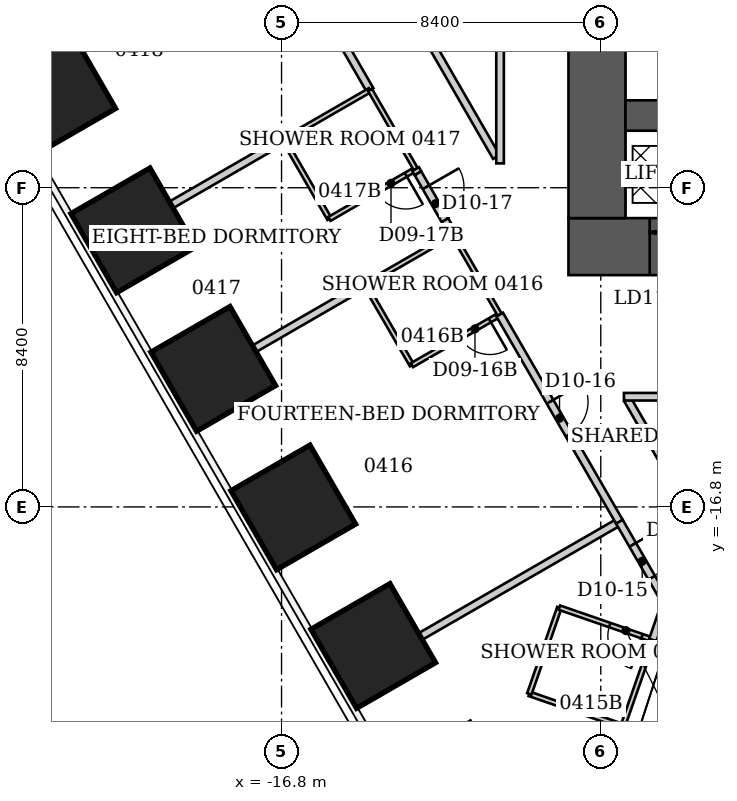
"""IFC4 building model, lengths in metres.
Left out: names, types, materials, properties, quantities, classifications, styles, units other than length and angle.
Written with IfcOpenShell. Run it as: python <this file> out.ifc"""

import sys

from ifc_helpers import new_model, si_unit, direction, frame, frame_2d, origin, origin_2d, place, context, subcontext, project, spatial, rectangle, extrude, element, fill, save


model = new_model("IFC4")
c1 = context("Model", 3, precision=1e-05, world=origin(), true_north=direction((0.0, 1.0)))
c2 = subcontext(c1, "Body", "Model", "MODEL_VIEW")
j1 = project(units=[si_unit("LENGTHUNIT", "METRE"), si_unit("PLANEANGLEUNIT", "RADIAN")], contexts=[c1])
p1 = place(None, origin())
s1 = spatial("IfcSite", under=j1, at=p1, CompositionType="ELEMENT")
p2 = place(p1, origin())
s2 = spatial("IfcBuilding", under=s1, at=p2, CompositionType="ELEMENT")
p3 = place(p2, frame((0.0, 0.0, 23.0)))
s3 = spatial("IfcBuildingStorey", under=s2, at=p3, CompositionType="ELEMENT", Elevation=23.0)
for number, where, z_axis, x_axis in (
    (1, (-14.387, -20.459, 0.0), (0.0, 0.0, 1.0), (-0.866, -0.5, 0.0)),
    (2, (-16.491, -16.813, 0.0), (0.0, 0.0, 1.0), (-0.866, -0.5, 0.0)),
    (3, (-18.596, -13.167, 0.0), (0.0, 0.0, 1.0), (-0.866, -0.5, 0.0)),
    (4, (-20.701, -9.521, 0.0), (0.0, 0.0, 1.0), (-0.866, -0.5, 0.0)),
    (5, (-22.806, -5.875, 0.0), (0.0, 0.0, 1.0), (-0.866, -0.5, 0.0)),
):
    element("IfcColumn", number, at=place(p3, frame(where, z_axis=z_axis, x_axis=x_axis)), inside=s3, PredefinedType="COLUMN", context=c2, shape_type="SweptSolid", body=[
        extrude(rectangle(XDim=2.4, YDim=2.4, at=origin_2d()), origin(), (0.0, 0.0, 1.0), 3.8),
    ])
p4 = place(p3, frame((-9.25, -9.95, 0.0), z_axis=(0.0, 0.0, 1.0), x_axis=(1.0, 0.0, 0.0)))
e6 = element("IfcWall", 6, at=p4, inside=s3, PredefinedType="SHEAR", context=c2, shape_type="SweptSolid", body=[
    extrude(rectangle(XDim=18.5, YDim=1.5, at=frame_2d((9.25, 0.0))), origin(), (0.0, 0.0, 1.0), 3.8),
])
p5 = place(p4, frame((2.137, 0.0, 0.0)))
e7 = element("IfcOpeningElement", 7, at=p5, cuts=e6, PredefinedType="OPENING", context=c2, shape_type="SweptSolid", body=[
    extrude(rectangle(XDim=1.1, YDim=2.1, at=frame_2d((0.55, 1.05))), frame((0.0, 0.75, 0.0), z_axis=(0.0, -1.0, 0.0), x_axis=(1.0, 0.0, 0.0)), (0.0, 0.0, 1.0), 1.5),
])
p6 = place(p4, frame((4.762, 0.0, 0.0)))
e8 = element("IfcOpeningElement", 8, at=p6, cuts=e6, PredefinedType="OPENING", context=c2, shape_type="SweptSolid", body=[
    extrude(rectangle(XDim=1.1, YDim=2.1, at=frame_2d((0.55, 1.05))), frame((0.0, 0.75, 0.0), z_axis=(0.0, -1.0, 0.0), x_axis=(1.0, 0.0, 0.0)), (0.0, 0.0, 1.0), 1.5),
])
p7 = place(p4, frame((7.387, 0.0, 0.0)))
e9 = element("IfcOpeningElement", 9, at=p7, cuts=e6, PredefinedType="OPENING", context=c2, shape_type="SweptSolid", body=[
    extrude(rectangle(XDim=1.1, YDim=2.1, at=frame_2d((0.55, 1.05))), frame((0.0, 0.75, 0.0), z_axis=(0.0, -1.0, 0.0), x_axis=(1.0, 0.0, 0.0)), (0.0, 0.0, 1.0), 1.5),
])
p8 = place(p3, frame((-8.5, -9.2, 0.0), z_axis=(0.0, 0.0, 1.0), x_axis=(0.0, 1.0, 0.0)))
e10 = element("IfcWall", 10, at=p8, inside=s3, PredefinedType="SHEAR", context=c2, shape_type="SweptSolid", body=[
    extrude(rectangle(XDim=15.3, YDim=1.5, at=frame_2d((7.65, 0.0))), origin(), (0.0, 0.0, 1.0), 3.8),
])
p9 = place(p8, frame((10.7, 0.0, 0.0)))
e11 = element("IfcOpeningElement", 11, at=p9, cuts=e10, PredefinedType="OPENING", context=c2, shape_type="SweptSolid", body=[
    extrude(rectangle(XDim=1.2, YDim=2.2, at=frame_2d((0.6, 1.1))), frame((0.0, 0.75, 0.0), z_axis=(0.0, -1.0, 0.0), x_axis=(1.0, 0.0, 0.0)), (0.0, 0.0, 1.0), 1.5),
])
p10 = place(p3, frame((-7.75, -6.5, 0.0), z_axis=(0.0, 0.0, 1.0), x_axis=(1.0, 0.0, 0.0)))
e12 = element("IfcWall", 12, at=p10, inside=s3, PredefinedType="SHEAR", context=c2, shape_type="SweptSolid", body=[
    extrude(rectangle(XDim=15.5, YDim=0.8, at=frame_2d((7.75, 0.0))), origin(), (0.0, 0.0, 1.0), 3.8),
])
p11 = place(p3, frame((-21.726, -10.02, 0.0), z_axis=(0.0, 0.0, 1.0), x_axis=(0.865919350456, 0.50018364478, 0.0)))
e13 = element("IfcWall", 13, at=p11, inside=s3, PredefinedType="PARTITIONING", context=c2, shape_type="SweptSolid", body=[
    extrude(rectangle(XDim=5.758, YDim=0.2, at=frame_2d((2.879, 0.0))), origin(), (0.0, 0.0, 1.0), 3.023),
])
p12 = place(p3, frame((-19.546, -13.81, 0.0), z_axis=(0.0, 0.0, 1.0), x_axis=(0.865702137343, 0.500559496364, 0.0)))
e14 = element("IfcWall", 14, at=p12, inside=s3, PredefinedType="PARTITIONING", context=c2, shape_type="SweptSolid", body=[
    extrude(rectangle(XDim=5.713, YDim=0.2, at=frame_2d((2.857, 0.0))), origin(), (0.0, 0.0, 1.0), 3.038),
])
p13 = place(p3, frame((-17.62, -0.38, 0.0), z_axis=(0.0, 0.0, 1.0), x_axis=(0.500413927211, -0.865786290867, 0.0)))
e15 = element("IfcWall", 15, at=p13, inside=s3, PredefinedType="PARTITIONING", context=c2, shape_type="SweptSolid", body=[
    extrude(rectangle(XDim=6.295, YDim=0.2, at=frame_2d((3.147, 0.0))), origin(), (0.0, 0.0, 1.0), 3.64),
])
p14 = place(p13, frame((2.647, 0.0, 0.0)))
e16 = element("IfcOpeningElement", 16, at=p14, cuts=e15, PredefinedType="OPENING", context=c2, shape_type="SweptSolid", body=[
    extrude(rectangle(XDim=1.0, YDim=2.13, at=frame_2d((0.5, 1.065))), frame((0.0, 0.1, 0.0), z_axis=(0.0, -1.0, 0.0), x_axis=(1.0, 0.0, 0.0)), (0.0, 0.0, 1.0), 0.2),
])
p15 = place(p3, frame((-16.74, -7.14, 0.0), z_axis=(0.0, 0.0, 1.0), x_axis=(0.499693115345, -0.866202511239, 0.0)))
e17 = element("IfcWall", 17, at=p15, inside=s3, PredefinedType="PARTITIONING", context=c2, shape_type="SweptSolid", body=[
    extrude(rectangle(XDim=2.401, YDim=0.12, at=frame_2d((1.201, 0.0))), origin(), (0.0, 0.0, 1.0), 3.64),
])
p16 = place(p3, frame((-16.74, -7.14, 0.0), z_axis=(0.0, 0.0, 1.0), x_axis=(0.866154567199, 0.49977621564, 0.0)))
e18 = element("IfcWall", 18, at=p16, inside=s3, PredefinedType="PARTITIONING", context=c2, shape_type="SweptSolid", body=[
    extrude(rectangle(XDim=2.621, YDim=0.12, at=frame_2d((1.311, 0.0))), origin(), (0.0, 0.0, 1.0), 3.023),
])
p17 = place(p3, frame((-15.54, -9.22, 0.0), z_axis=(0.0, 0.0, 1.0), x_axis=(0.866114241029, 0.499846097802, 0.0)))
e19 = element("IfcWall", 19, at=p17, inside=s3, PredefinedType="PARTITIONING", context=c2, shape_type="SweptSolid", body=[
    extrude(rectangle(XDim=2.621, YDim=0.12, at=frame_2d((1.311, 0.0))), origin(), (0.0, 0.0, 1.0), 3.64),
])
p18 = place(p17, frame((1.421, 0.0, 0.0)))
e20 = element("IfcOpeningElement", 20, at=p18, cuts=e19, PredefinedType="OPENING", context=c2, shape_type="SweptSolid", body=[
    extrude(rectangle(XDim=0.9, YDim=2.03, at=frame_2d((0.45, 1.015))), frame((0.0, 0.06, 0.0), z_axis=(0.0, -1.0, 0.0), x_axis=(1.0, 0.0, 0.0)), (0.0, 0.0, 1.0), 0.12),
])
p19 = place(p3, frame((-15.176, -21.38, 0.0), z_axis=(0.0, 0.0, 1.0), x_axis=(0.866276837306, 0.49956425127, 0.0)))
e21 = element("IfcWall", 21, at=p19, inside=s3, PredefinedType="PARTITIONING", context=c2, shape_type="SweptSolid", body=[
    extrude(rectangle(XDim=8.373, YDim=0.2, at=frame_2d((4.186, 0.0))), origin(), (0.0, 0.0, 1.0), 3.64),
])
p20 = place(p3, frame((-14.6, -10.95, 0.0), z_axis=(0.0, 0.0, 1.0), x_axis=(0.501888006485, -0.864932615264, 0.0)))
e22 = element("IfcWall", 22, at=p20, inside=s3, PredefinedType="PARTITIONING", context=c2, shape_type="SweptSolid", body=[
    extrude(rectangle(XDim=2.451, YDim=0.12, at=frame_2d((1.226, 0.0))), origin(), (0.0, 0.0, 1.0), 3.64),
])
p21 = place(p3, frame((-14.6, -10.95, 0.0), z_axis=(0.0, 0.0, 1.0), x_axis=(0.866654860089, 0.498908161372, 0.0)))
e23 = element("IfcWall", 23, at=p21, inside=s3, PredefinedType="PARTITIONING", context=c2, shape_type="SweptSolid", body=[
    extrude(rectangle(XDim=2.666, YDim=0.12, at=frame_2d((1.333, 0.0))), origin(), (0.0, 0.0, 1.0), 3.038),
])
p22 = place(p3, frame((-14.47, -5.83, 0.0), z_axis=(0.0, 0.0, 1.0), x_axis=(0.499737123639, -0.866177122335, 0.0)))
e24 = element("IfcWall", 24, at=p22, inside=s3, PredefinedType="PARTITIONING", context=c2, shape_type="SweptSolid", body=[
    extrude(rectangle(XDim=2.401, YDim=0.12, at=frame_2d((1.201, 0.0))), origin(), (0.0, 0.0, 1.0), 3.64),
])
p23 = place(p3, frame((-13.37, -13.07, 0.0), z_axis=(0.0, 0.0, 1.0), x_axis=(0.866615255992, 0.498976951453, 0.0)))
e25 = element("IfcWall", 25, at=p23, inside=s3, PredefinedType="PARTITIONING", context=c2, shape_type="SweptSolid", body=[
    extrude(rectangle(XDim=2.666, YDim=0.12, at=frame_2d((1.333, 0.0))), origin(), (0.0, 0.0, 1.0), 3.64),
])
p24 = place(p23, frame((1.466, 0.0, 0.0)))
e26 = element("IfcOpeningElement", 26, at=p24, cuts=e25, PredefinedType="OPENING", context=c2, shape_type="SweptSolid", body=[
    extrude(rectangle(XDim=0.9, YDim=2.03, at=frame_2d((0.45, 1.015))), frame((0.0, 0.06, 0.0), z_axis=(0.0, -1.0, 0.0), x_axis=(1.0, 0.0, 0.0)), (0.0, 0.0, 1.0), 0.12),
])
p25 = place(p3, frame((-13.27, -7.91, 0.0), z_axis=(0.0, 0.0, 1.0), x_axis=(0.478852130681, -0.877895572914, 0.0)))
e27 = element("IfcWall", 27, at=p25, inside=s3, PredefinedType="PARTITIONING", context=c2, shape_type="SweptSolid", body=[
    extrude(rectangle(XDim=0.125, YDim=0.2, at=frame_2d((0.063, 0.0))), origin(), (0.0, 0.0, 1.0), 3.64),
])
p26 = place(p3, frame((-13.21, -8.02, 0.0), z_axis=(0.0, 0.0, 1.0), x_axis=(0.498473609767, -0.866904873885, 0.0)))
e28 = element("IfcWall", 28, at=p26, inside=s3, PredefinedType="PARTITIONING", context=c2, shape_type="SweptSolid", body=[
    extrude(rectangle(XDim=1.845, YDim=0.2, at=frame_2d((0.923, 0.0))), origin(), (0.0, 0.0, 1.0), 3.64),
])
p27 = place(p26, frame((0.423, 0.0, 0.0)))
e29 = element("IfcOpeningElement", 29, at=p27, cuts=e28, PredefinedType="OPENING", context=c2, shape_type="SweptSolid", body=[
    extrude(rectangle(XDim=1.0, YDim=2.13, at=frame_2d((0.5, 1.065))), frame((0.0, 0.1, 0.0), z_axis=(0.0, -1.0, 0.0), x_axis=(1.0, 0.0, 0.0)), (0.0, 0.0, 1.0), 0.2),
])
p28 = place(p3, frame((-12.29, -9.62, 0.0), z_axis=(0.0, 0.0, 1.0), x_axis=(0.501856726365, -0.86495076519, 0.0)))
e30 = element("IfcWall", 30, at=p28, inside=s3, PredefinedType="PARTITIONING", context=c2, shape_type="SweptSolid", body=[
    extrude(rectangle(XDim=2.451, YDim=0.12, at=frame_2d((1.226, 0.0))), origin(), (0.0, 0.0, 1.0), 3.64),
])
p29 = place(p3, frame((-11.147, -7.591, 0.0), z_axis=(0.0, 0.0, 1.0), x_axis=(-0.499756496688, 0.86616594485, 0.0)))
e31 = element("IfcWall", 31, at=p29, inside=s3, PredefinedType="PARTITIONING", context=c2, shape_type="SweptSolid", body=[
    extrude(rectangle(XDim=13.451, YDim=0.2, at=frame_2d((6.726, 0.0))), origin(), (0.0, 0.0, 1.0), 3.64),
])
p30 = place(p3, frame((-11.06, -11.74, 0.0), z_axis=(0.0, 0.0, 1.0), x_axis=(0.500384855356, -0.865803093394, 0.0)))
e32 = element("IfcWall", 32, at=p30, inside=s3, PredefinedType="PARTITIONING", context=c2, shape_type="SweptSolid", body=[
    extrude(rectangle(XDim=6.295, YDim=0.2, at=frame_2d((3.147, 0.0))), origin(), (0.0, 0.0, 1.0), 3.64),
])
p31 = place(p30, frame((2.647, 0.0, 0.0)))
e33 = element("IfcOpeningElement", 33, at=p31, cuts=e32, PredefinedType="OPENING", context=c2, shape_type="SweptSolid", body=[
    extrude(rectangle(XDim=1.0, YDim=2.13, at=frame_2d((0.5, 1.065))), frame((0.0, 0.1, 0.0), z_axis=(0.0, -1.0, 0.0), x_axis=(1.0, 0.0, 0.0)), (0.0, 0.0, 1.0), 0.2),
])
p32 = place(p3, frame((-11.05, 9.4, 0.0), z_axis=(0.0, 0.0, 1.0), x_axis=(0.0, -1.0, 0.0)))
e34 = element("IfcWall", 34, at=p32, inside=s3, PredefinedType="PARTITIONING", context=c2, shape_type="SweptSolid", body=[
    extrude(rectangle(XDim=17.16, YDim=0.2, at=frame_2d((8.58, 0.0))), origin(), (0.0, 0.0, 1.0), 3.64),
])
p33 = place(p32, frame((8.03, 0.0, 0.0)))
e35 = element("IfcOpeningElement", 35, at=p33, cuts=e34, PredefinedType="OPENING", context=c2, shape_type="SweptSolid", body=[
    extrude(rectangle(XDim=1.1, YDim=2.2, at=frame_2d((0.55, 1.1))), frame((0.0, 0.1, 0.0), z_axis=(0.0, -1.0, 0.0), x_axis=(1.0, 0.0, 0.0)), (0.0, 0.0, 1.0), 0.2),
])
p34 = place(p3, frame((-10.28, -21.72, 0.0), z_axis=(0.0, 0.0, 1.0), x_axis=(0.94515546045, -0.326620813149, 0.0)))
e36 = element("IfcWall", 36, at=p34, inside=s3, PredefinedType="PARTITIONING", context=c2, shape_type="SweptSolid", body=[
    extrude(rectangle(XDim=2.603, YDim=0.12, at=frame_2d((1.301, 0.0))), origin(), (0.0, 0.0, 1.0), 3.64),
])
p35 = place(p3, frame((-9.49, -19.45, 0.0), z_axis=(0.0, 0.0, 1.0), x_axis=(-0.328693963496, -0.944436487203, 0.0)))
e37 = element("IfcWall", 37, at=p35, inside=s3, PredefinedType="PARTITIONING", context=c2, shape_type="SweptSolid", body=[
    extrude(rectangle(XDim=2.404, YDim=0.12, at=frame_2d((1.202, 0.0))), origin(), (0.0, 0.0, 1.0), 3.64),
])
p36 = place(p3, frame((-7.91, -17.19, 0.0), z_axis=(0.0, 0.0, 1.0), x_axis=(0.499693115345, -0.866202511239, 0.0)))
e38 = element("IfcWall", 38, at=p36, inside=s3, PredefinedType="PARTITIONING", context=c2, shape_type="SweptSolid", body=[
    extrude(rectangle(XDim=2.401, YDim=0.2, at=frame_2d((1.201, 0.0))), origin(), (0.0, 0.0, 1.0), 3.64),
])
p37 = place(p36, frame((0.701, 0.0, 0.0)))
e39 = element("IfcOpeningElement", 39, at=p37, cuts=e38, PredefinedType="OPENING", context=c2, shape_type="SweptSolid", body=[
    extrude(rectangle(XDim=1.0, YDim=2.13, at=frame_2d((0.5, 1.065))), frame((0.0, 0.1, 0.0), z_axis=(0.0, -1.0, 0.0), x_axis=(1.0, 0.0, 0.0)), (0.0, 0.0, 1.0), 0.2),
])
p38 = place(p3, frame((-7.82, -22.57, 0.0), z_axis=(0.0, 0.0, 1.0), x_axis=(0.328693963496, 0.944436487203, 0.0)))
e40 = element("IfcWall", 40, at=p38, inside=s3, PredefinedType="PARTITIONING", context=c2, shape_type="SweptSolid", body=[
    extrude(rectangle(XDim=2.404, YDim=0.12, at=frame_2d((1.202, 0.0))), origin(), (0.0, 0.0, 1.0), 3.64),
])
p39 = place(p3, frame((-7.03, -20.3, 0.0), z_axis=(0.0, 0.0, 1.0), x_axis=(-0.94515546045, 0.326620813149, 0.0)))
e41 = element("IfcWall", 41, at=p39, inside=s3, PredefinedType="PARTITIONING", context=c2, shape_type="SweptSolid", body=[
    extrude(rectangle(XDim=2.603, YDim=0.12, at=frame_2d((1.301, 0.0))), origin(), (0.0, 0.0, 1.0), 3.64),
])
p40 = place(p39, frame((0.3, 0.0, 0.0)))
e42 = element("IfcOpeningElement", 42, at=p40, cuts=e41, PredefinedType="OPENING", context=c2, shape_type="SweptSolid", body=[
    extrude(rectangle(XDim=0.9, YDim=2.03, at=frame_2d((0.45, 1.015))), frame((0.0, 0.06, 0.0), z_axis=(0.0, -1.0, 0.0), x_axis=(1.0, 0.0, 0.0)), (0.0, 0.0, 1.0), 0.12),
])
p41 = place(p3, frame((-7.03, -20.3, 0.0), z_axis=(0.0, 0.0, 1.0), x_axis=(0.32487799312, 0.945755935528, 0.0)))
e43 = element("IfcWall", 43, at=p41, inside=s3, PredefinedType="PARTITIONING", context=c2, shape_type="SweptSolid", body=[
    extrude(rectangle(XDim=0.947, YDim=0.2, at=frame_2d((0.473, 0.0))), origin(), (0.0, 0.0, 1.0), 3.64),
])
p42 = place(p3, frame((-4.38, -19.71, 0.0), z_axis=(0.0, 0.0, 1.0), x_axis=(-0.500523653757, 0.865722860984, 0.0)))
e44 = element("IfcWall", 44, at=p42, inside=s3, PredefinedType="PARTITIONING", context=c2, shape_type="SweptSolid", body=[
    extrude(rectangle(XDim=6.628, YDim=0.2, at=frame_2d((3.314, 0.0))), origin(), (0.0, 0.0, 1.0), 3.64),
])
p43 = place(p42, frame((2.764, 0.0, 0.0)))
e45 = element("IfcOpeningElement", 45, at=p43, cuts=e44, PredefinedType="OPENING", context=c2, shape_type="SweptSolid", body=[
    extrude(rectangle(XDim=1.1, YDim=2.2, at=frame_2d((0.55, 1.1))), frame((0.0, 0.1, 0.0), z_axis=(0.0, -1.0, 0.0), x_axis=(1.0, 0.0, 0.0)), (0.0, 0.0, 1.0), 0.2),
])
p44 = place(p3, frame((0.18, -13.9, 0.0), z_axis=(0.0, 0.0, 1.0), x_axis=(-1.0, 0.0, 0.0)))
e46 = element("IfcWall", 46, at=p44, inside=s3, PredefinedType="PARTITIONING", context=c2, shape_type="SweptSolid", body=[
    extrude(rectangle(XDim=7.97, YDim=0.2, at=frame_2d((3.985, 0.0))), origin(), (0.0, 0.0, 1.0), 3.64),
])
p45 = place(p44, frame((3.035, 0.0, 0.0)))
e47 = element("IfcOpeningElement", 47, at=p45, cuts=e46, PredefinedType="OPENING", context=c2, shape_type="SweptSolid", body=[
    extrude(rectangle(XDim=1.1, YDim=2.2, at=frame_2d((0.55, 1.1))), frame((0.0, 0.1, 0.0), z_axis=(0.0, -1.0, 0.0), x_axis=(1.0, 0.0, 0.0)), (0.0, 0.0, 1.0), 0.2),
])
p46 = place(p37, origin())
e48 = element("IfcDoor", 48, at=p46, inside=s3, OperationType="SINGLE_SWING_LEFT", PredefinedType="DOOR", context=c2, shape_type="SweptSolid", body=[
    extrude(rectangle(XDim=1.0, YDim=2.13, at=frame_2d((0.5, 1.065))), frame((0.0, 0.025, 0.0), z_axis=(0.0, -1.0, 0.0), x_axis=(1.0, 0.0, 0.0)), (0.0, 0.0, 1.0), 0.05),
])
fill(e39, e48)
p47 = place(p40, origin())
e49 = element("IfcDoor", 49, at=p47, inside=s3, OperationType="SINGLE_SWING_LEFT", PredefinedType="DOOR", context=c2, shape_type="SweptSolid", body=[
    extrude(rectangle(XDim=0.9, YDim=2.03, at=frame_2d((0.45, 1.015))), frame((0.0, 0.025, 0.0), z_axis=(0.0, -1.0, 0.0), x_axis=(1.0, 0.0, 0.0)), (0.0, 0.0, 1.0), 0.05),
])
fill(e42, e49)
p48 = place(p31, origin())
e50 = element("IfcDoor", 50, at=p48, inside=s3, OperationType="SINGLE_SWING_LEFT", PredefinedType="DOOR", context=c2, shape_type="SweptSolid", body=[
    extrude(rectangle(XDim=1.0, YDim=2.13, at=frame_2d((0.5, 1.065))), frame((0.0, 0.025, 0.0), z_axis=(0.0, -1.0, 0.0), x_axis=(1.0, 0.0, 0.0)), (0.0, 0.0, 1.0), 0.05),
])
fill(e33, e50)
p49 = place(p24, origin())
e51 = element("IfcDoor", 51, at=p49, inside=s3, OperationType="SINGLE_SWING_RIGHT", PredefinedType="DOOR", context=c2, shape_type="SweptSolid", body=[
    extrude(rectangle(XDim=0.9, YDim=2.03, at=frame_2d((0.45, 1.015))), frame((0.0, 0.025, 0.0), z_axis=(0.0, -1.0, 0.0), x_axis=(1.0, 0.0, 0.0)), (0.0, 0.0, 1.0), 0.05),
])
fill(e26, e51)
p50 = place(p27, origin())
e52 = element("IfcDoor", 52, at=p50, inside=s3, OperationType="SINGLE_SWING_LEFT", PredefinedType="DOOR", context=c2, shape_type="SweptSolid", body=[
    extrude(rectangle(XDim=1.0, YDim=2.13, at=frame_2d((0.5, 1.065))), frame((0.0, 0.025, 0.0), z_axis=(0.0, -1.0, 0.0), x_axis=(1.0, 0.0, 0.0)), (0.0, 0.0, 1.0), 0.05),
])
fill(e29, e52)
p51 = place(p18, origin())
e53 = element("IfcDoor", 53, at=p51, inside=s3, OperationType="SINGLE_SWING_RIGHT", PredefinedType="DOOR", context=c2, shape_type="SweptSolid", body=[
    extrude(rectangle(XDim=0.9, YDim=2.03, at=frame_2d((0.45, 1.015))), frame((0.0, 0.025, 0.0), z_axis=(0.0, -1.0, 0.0), x_axis=(1.0, 0.0, 0.0)), (0.0, 0.0, 1.0), 0.05),
])
fill(e20, e53)
p52 = place(p5, origin())
e54 = element("IfcDoor", 54, at=p52, inside=s3, OperationType="DOUBLE_DOOR_SLIDING", PredefinedType="DOOR", context=c2, shape_type="SweptSolid", body=[
    extrude(rectangle(XDim=1.1, YDim=2.1, at=frame_2d((0.55, 1.05))), frame((0.0, 0.025, 0.0), z_axis=(0.0, -1.0, 0.0), x_axis=(1.0, 0.0, 0.0)), (0.0, 0.0, 1.0), 0.05),
])
fill(e7, e54)
save(model, sys.argv[1])
